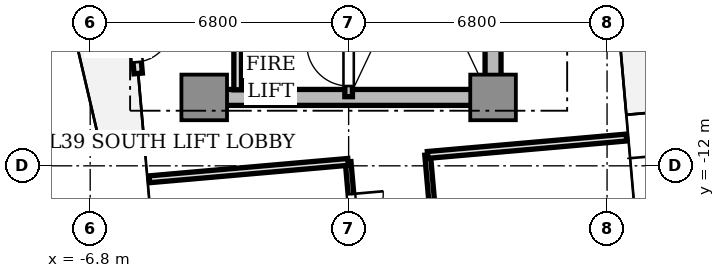
"""IFC4 building model, lengths in metres.
Left out: names, types, materials, properties, quantities, classifications, styles, units other than length and angle.
Written with IfcOpenShell. Run it as: python <this file> out.ifc"""

import sys

from ifc_helpers import new_model, si_unit, direction, frame, frame_2d, origin, origin_2d, place, context, subcontext, project, spatial, rectangle, extrude, source, transform, mapped, element, fill, save


model = new_model("IFC4")
c1 = context("Model", 3, precision=1e-05, world=origin(), true_north=direction((0.0, 1.0)))
c2 = subcontext(c1, "Body", "Model", "MODEL_VIEW")
j1 = project(units=[si_unit("LENGTHUNIT", "METRE"), si_unit("PLANEANGLEUNIT", "RADIAN")], contexts=[c1])
p1 = place(None, origin())
s1 = spatial("IfcSite", under=j1, at=p1, CompositionType="ELEMENT")
p2 = place(p1, origin())
s2 = spatial("IfcBuilding", under=s1, at=p2, CompositionType="ELEMENT")
p3 = place(p2, frame((0.0, 0.0, 142.75)))
s3 = spatial("IfcBuildingStorey", under=s2, at=p3, CompositionType="ELEMENT", Elevation=142.75)
p4 = place(p3, frame((-3.55, -10.2, 0.0), z_axis=(0.0, 0.0, 1.0), x_axis=(1.0, 0.0, 0.0)))
e1 = element("IfcWall", 1, at=p4, inside=s3, PredefinedType="SHEAR", context=c2, shape_type="SweptSolid", body=[
    extrude(rectangle(XDim=7.1, YDim=0.42, at=frame_2d((3.55, 0.0))), origin(), (0.0, 0.0, 1.0), 4.26),
])
p5 = place(p3, frame((3.8, -9.75, 0.0), z_axis=(0.0, 0.0, 1.0), x_axis=(0.0, 1.0, 0.0)))
e2 = element("IfcWall", 2, at=p5, inside=s3, PredefinedType="SHEAR", context=c2, shape_type="SweptSolid", body=[
    extrude(rectangle(XDim=6.9, YDim=0.42, at=frame_2d((3.45, 0.0))), origin(), (0.0, 0.0, 1.0), 4.26),
])
m1 = source(origin(), c2, "Body", "SweptSolid", [
    extrude(rectangle(XDim=1.2, YDim=1.2, at=origin_2d()), origin(), (0.0, 0.0, 1.0), 4.26),
])
for number, where, z_axis, x_axis in (
    (3, (-3.8, -10.2, 0.0), (0.0, 0.0, 1.0), (1.0, 0.0, 0.0)),
    (4, (3.8, -10.2, 0.0), (0.0, 0.0, 1.0), (1.0, 0.0, 0.0)),
):
    element("IfcColumn", number, at=place(p3, frame(where, z_axis=z_axis, x_axis=x_axis)), inside=s3, PredefinedType="COLUMN", context=c2, shape_type="MappedRepresentation", body=[
        mapped(m1, transform((0.0, 0.0, 0.0), scale=1.0)),
    ])
p6 = place(p3, frame((-5.772, -6.879, 0.0), z_axis=(0.0, 0.0, 1.0), x_axis=(0.087168071984, -0.996193619346, 0.0)))
e5 = element("IfcWall", 5, at=p6, inside=s3, PredefinedType="STANDARD", context=c2, shape_type="SweptSolid", body=[
    extrude(rectangle(XDim=2.7, YDim=0.22, at=frame_2d((1.35, 0.0))), origin(), (0.0, 0.0, 1.0), 4.26),
])
p7 = place(p6, frame((1.4, 0.0, 0.0)))
e6 = element("IfcOpeningElement", 6, at=p7, cuts=e5, PredefinedType="OPENING", context=c2, shape_type="SweptSolid", body=[
    extrude(rectangle(XDim=1.0, YDim=2.2, at=frame_2d((0.5, 1.1))), frame((0.0, 0.12, 0.0), z_axis=(0.0, -1.0, 0.0), x_axis=(1.0, 0.0, 0.0)), (0.0, 0.0, 1.0), 0.24),
])
p8 = place(p3, frame((0.0, -10.18, 0.0), z_axis=(0.0, 0.0, 1.0), x_axis=(0.0, 1.0, 0.0)))
e7 = element("IfcWall", 7, at=p8, inside=s3, PredefinedType="SOLIDWALL", context=c2, shape_type="SweptSolid", body=[
    extrude(rectangle(XDim=7.68, YDim=0.2, at=frame_2d((3.84, 0.0))), origin(), (0.0, 0.0, 1.0), 4.26),
])
p9 = place(p8, frame((0.28, 0.0, 0.0)))
e8 = element("IfcOpeningElement", 8, at=p9, cuts=e7, PredefinedType="OPENING", context=c2, shape_type="SweptSolid", body=[
    extrude(rectangle(XDim=1.1, YDim=2.15, at=frame_2d((0.55, 1.075))), frame((0.0, 0.11, 0.0), z_axis=(0.0, -1.0, 0.0), x_axis=(1.0, 0.0, 0.0)), (0.0, 0.0, 1.0), 0.22),
])
p10 = place(p3, frame((-2.92, -10.0, 0.0), z_axis=(0.0, 0.0, 1.0), x_axis=(0.0, 1.0, 0.0)))
e9 = element("IfcWall", 9, at=p10, inside=s3, PredefinedType="SOLIDWALL", context=c2, shape_type="SweptSolid", body=[
    extrude(rectangle(XDim=1.44, YDim=0.2, at=frame_2d((0.72, 0.0))), origin(), (0.0, 0.0, 1.0), 3.81),
])
p11 = place(p3, frame((2.079, -11.713, 0.0), z_axis=(0.0, 0.0, 1.0), x_axis=(0.087136303517, -0.996196398613, 0.0)))
e10 = element("IfcWall", 10, at=p11, inside=s3, PredefinedType="PARTITIONING", context=c2, shape_type="SweptSolid", body=[
    extrude(rectangle(XDim=8.4, YDim=0.15, at=frame_2d((4.2, 0.0))), origin(), (0.0, 0.0, 1.0), 3.81),
])
p12 = place(p11, frame((2.5, 0.0, 0.0)))
e11 = element("IfcOpeningElement", 11, at=p12, cuts=e10, PredefinedType="OPENING", context=c2, shape_type="SweptSolid", body=[
    extrude(rectangle(XDim=0.85, YDim=2.1, at=frame_2d((0.425, 1.05))), frame((0.0, 0.085, 0.0), z_axis=(0.0, -1.0, 0.0), x_axis=(1.0, 0.0, 0.0)), (0.0, 0.0, 1.0), 0.17),
])
p13 = place(p3, frame((-0.013, -11.896, 0.0), z_axis=(0.0, 0.0, 1.0), x_axis=(0.087165147537, -0.996193875235, 0.0)))
e12 = element("IfcWall", 12, at=p13, inside=s3, PredefinedType="PARTITIONING", context=c2, shape_type="SweptSolid", body=[
    extrude(rectangle(XDim=8.4, YDim=0.15, at=frame_2d((4.2, 0.0))), origin(), (0.0, 0.0, 1.0), 3.81),
])
p14 = place(p13, frame((0.85, 0.0, 0.0)))
e13 = element("IfcOpeningElement", 13, at=p14, cuts=e12, PredefinedType="OPENING", context=c2, shape_type="SweptSolid", body=[
    extrude(rectangle(XDim=0.85, YDim=2.1, at=frame_2d((0.425, 1.05))), frame((0.0, 0.085, 0.0), z_axis=(0.0, -1.0, 0.0), x_axis=(1.0, 0.0, 0.0)), (0.0, 0.0, 1.0), 0.17),
])
p15 = place(p13, frame((4.075, 0.0, 0.0)))
e14 = element("IfcOpeningElement", 14, at=p15, cuts=e12, PredefinedType="OPENING", context=c2, shape_type="SweptSolid", body=[
    extrude(rectangle(XDim=0.85, YDim=2.1, at=frame_2d((0.425, 1.05))), frame((0.0, 0.085, 0.0), z_axis=(0.0, -1.0, 0.0), x_axis=(1.0, 0.0, 0.0)), (0.0, 0.0, 1.0), 0.17),
])
for number, where, z_axis, x_axis in (
    (15, (2.079, -11.713, 0.0), (0.0, 0.0, 1.0), (0.996, 0.087, 0.0)),
    (16, (-5.243, -12.354, 0.0), (0.0, 0.0, 1.0), (0.996, 0.087, 0.0)),
):
    element("IfcWall", number, at=place(p3, frame(where, z_axis=z_axis, x_axis=x_axis)), inside=s3, PredefinedType="PARTITIONING", context=c2, shape_type="SweptSolid", body=[
        extrude(rectangle(XDim=5.25, YDim=0.18, at=frame_2d((2.625, 0.0))), origin(), (0.0, 0.0, 1.0), 3.78),
    ])
m2 = source(origin(), c2, "Body", "SweptSolid", [
    extrude(rectangle(XDim=1.0, YDim=0.05, at=origin_2d()), origin(), (0.0, 0.0, 1.0), 2.2),
])
p16 = place(p7, frame((0.5, 0.0, 0.0)))
e17 = element("IfcDoor", 17, at=p16, inside=s3, OperationType="SINGLE_SWING_LEFT", PredefinedType="DOOR", context=c2, shape_type="MappedRepresentation", body=[
    mapped(m2, transform((0.0, 0.0, 0.0), scale=1.0)),
])
fill(e6, e17)
m3 = source(origin(), c2, "Body", "SweptSolid", [
    extrude(rectangle(XDim=1.1, YDim=0.05, at=origin_2d()), origin(), (0.0, 0.0, 1.0), 2.15),
])
p17 = place(p9, frame((0.55, 0.0, 0.0)))
e18 = element("IfcDoor", 18, at=p17, inside=s3, OperationType="SINGLE_SWING_RIGHT", PredefinedType="DOOR", context=c2, shape_type="MappedRepresentation", body=[
    mapped(m3, transform((0.0, 0.0, 0.0), scale=1.0)),
])
fill(e8, e18)
m4 = source(origin(), c2, "Body", "SweptSolid", [
    extrude(rectangle(XDim=0.85, YDim=0.05, at=origin_2d()), origin(), (0.0, 0.0, 1.0), 2.1),
])
p18 = place(p14, frame((0.425, 0.0, 0.0)))
e19 = element("IfcDoor", 19, at=p18, inside=s3, OperationType="SINGLE_SWING_LEFT", PredefinedType="DOOR", context=c2, shape_type="MappedRepresentation", body=[
    mapped(m4, transform((0.0, 0.0, 0.0), scale=1.0)),
])
fill(e13, e19)
save(model, sys.argv[1])
